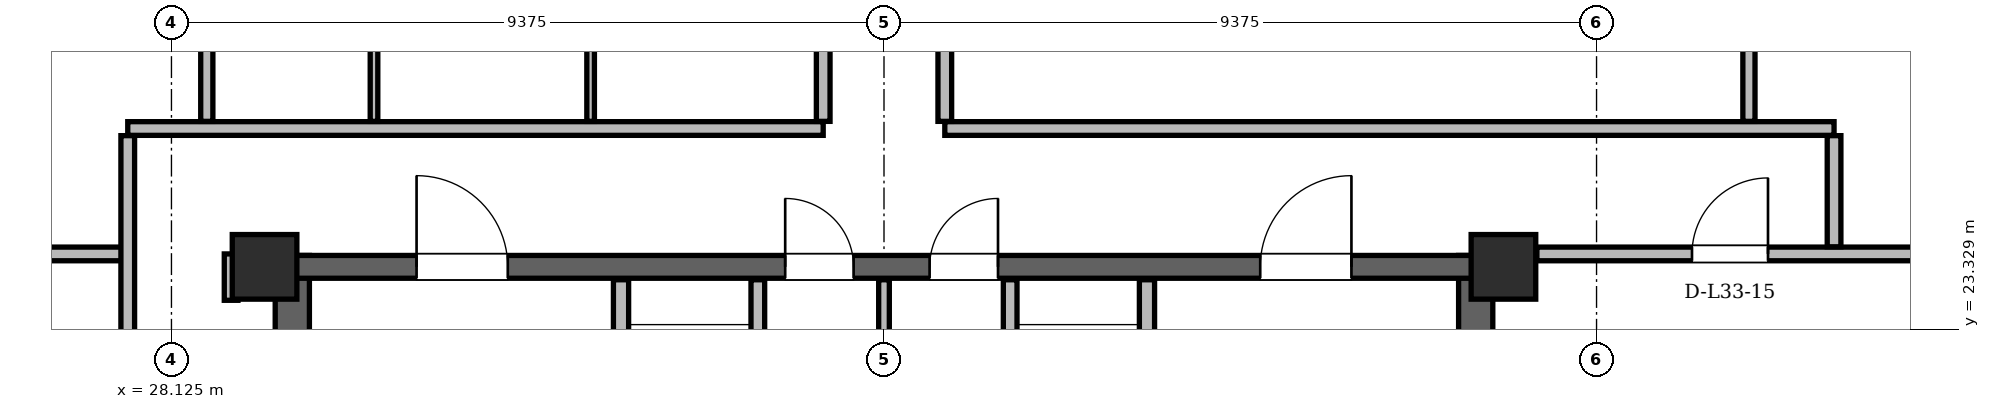
"""IFC4 building model, lengths in metres.
Left out: names, types, materials, properties, quantities, classifications, styles, units other than length and angle.
Written with IfcOpenShell. Run it as: python <this file> out.ifc"""

import sys

from ifc_helpers import new_model, si_unit, direction, frame, frame_2d, origin, origin_2d, place, context, subcontext, project, spatial, rectangle, hollow_rectangle, extrude, element, fill, save


model = new_model("IFC4")
c1 = context("Model", 3, precision=1e-05, world=origin(), true_north=direction((0.0, 1.0)))
c2 = subcontext(c1, "Body", "Model", "MODEL_VIEW")
j1 = project(units=[si_unit("LENGTHUNIT", "METRE"), si_unit("PLANEANGLEUNIT", "RADIAN")], contexts=[c1])
p1 = place(None, origin())
s1 = spatial("IfcSite", under=j1, at=p1, CompositionType="ELEMENT")
p2 = place(p1, origin())
s2 = spatial("IfcBuilding", under=s1, at=p2, CompositionType="ELEMENT")
p3 = place(p2, frame((0.0, 0.0, 126.6)))
s3 = spatial("IfcBuildingStorey", under=s2, at=p3, CompositionType="ELEMENT", Elevation=126.6)
for number, where, z_axis, x_axis in (
    (1, (45.65, 24.15, 0.0), (0.0, 0.0, 1.0), (1.0, 0.0, 0.0)),
    (2, (29.35, 24.15, 0.0), (0.0, 0.0, 1.0), (1.0, 0.0, 0.0)),
):
    element("IfcColumn", number, at=place(p3, frame(where, z_axis=z_axis, x_axis=x_axis)), inside=s3, PredefinedType="COLUMN", context=c2, shape_type="SweptSolid", body=[
        extrude(hollow_rectangle(XDim=0.85, YDim=0.85, WallThickness=0.07, at=origin_2d()), origin(), (0.0, 0.0, 1.0), 3.6),
    ])
for number, where, z_axis, x_axis in (
    (3, (29.715, 11.0, 0.0), (0.0, 0.0, 1.0), (0.0, 1.0, 0.0)),
    (4, (45.285, 11.0, 0.0), (0.0, 0.0, 1.0), (0.0, 1.0, 0.0)),
):
    element("IfcWall", number, at=place(p3, frame(where, z_axis=z_axis, x_axis=x_axis)), inside=s3, PredefinedType="SHEAR", context=c2, shape_type="SweptSolid", body=[
        extrude(rectangle(XDim=13.3, YDim=0.45, at=frame_2d((6.65, 0.0))), origin(), (0.0, 0.0, 1.0), 3.36),
    ])
p4 = place(p3, frame((29.65, 24.15, 0.0), z_axis=(0.0, 0.0, 1.0), x_axis=(1.0, 0.0, 0.0)))
e5 = element("IfcWall", 5, at=p4, inside=s3, PredefinedType="SHEAR", context=c2, shape_type="SweptSolid", body=[
    extrude(rectangle(XDim=15.7, YDim=0.3, at=frame_2d((7.85, 0.0))), origin(), (0.0, 0.0, 1.0), 3.36),
])
p5 = place(p4, frame((1.7, 0.0, 0.0)))
e6 = element("IfcOpeningElement", 6, at=p5, cuts=e5, PredefinedType="OPENING", context=c2, shape_type="SweptSolid", body=[
    extrude(rectangle(XDim=1.2, YDim=2.2, at=frame_2d((0.6, 1.1))), frame((0.0, 0.15, 0.0), z_axis=(0.0, -1.0, 0.0), x_axis=(1.0, 0.0, 0.0)), (0.0, 0.0, 1.0), 0.3),
])
p6 = place(p4, frame((12.8, 0.0, 0.0)))
e7 = element("IfcOpeningElement", 7, at=p6, cuts=e5, PredefinedType="OPENING", context=c2, shape_type="SweptSolid", body=[
    extrude(rectangle(XDim=1.2, YDim=2.2, at=frame_2d((0.6, 1.1))), frame((0.0, 0.15, 0.0), z_axis=(0.0, -1.0, 0.0), x_axis=(1.0, 0.0, 0.0)), (0.0, 0.0, 1.0), 0.3),
])
p7 = place(p4, frame((6.55, 0.0, 0.0)))
e8 = element("IfcOpeningElement", 8, at=p7, cuts=e5, PredefinedType="OPENING", context=c2, shape_type="SweptSolid", body=[
    extrude(rectangle(XDim=0.9, YDim=2.05, at=frame_2d((0.45, 1.025))), frame((0.0, 0.15, 0.0), z_axis=(0.0, -1.0, 0.0), x_axis=(1.0, 0.0, 0.0)), (0.0, 0.0, 1.0), 0.3),
])
p8 = place(p4, frame((8.45, 0.0, 0.0)))
e9 = element("IfcOpeningElement", 9, at=p8, cuts=e5, PredefinedType="OPENING", context=c2, shape_type="SweptSolid", body=[
    extrude(rectangle(XDim=0.9, YDim=2.05, at=frame_2d((0.45, 1.025))), frame((0.0, 0.15, 0.0), z_axis=(0.0, -1.0, 0.0), x_axis=(1.0, 0.0, 0.0)), (0.0, 0.0, 1.0), 0.3),
])
p9 = place(p3, frame((60.311, 13.034, 0.0), z_axis=(0.0, 0.0, 1.0), x_axis=(-0.499998814518, 0.866026088222, 0.0)))
e10 = element("IfcWall", 10, at=p9, inside=s3, PredefinedType="SOLIDWALL", context=c2, shape_type="SweptSolid", body=[
    extrude(rectangle(XDim=35.049, YDim=0.34, at=frame_2d((17.524, 0.0))), origin(), (0.0, 0.0, 1.0), 2.578),
])
p10 = place(p9, frame((8.034, 0.0, 0.0)))
e11 = element("IfcOpeningElement", 11, at=p10, cuts=e10, PredefinedType="OPENING", context=c2, shape_type="SweptSolid", body=[
    extrude(rectangle(XDim=1.5, YDim=2.2, at=frame_2d((0.75, 1.1))), frame((0.0, 0.17, 0.0), z_axis=(0.0, -1.0, 0.0), x_axis=(1.0, 0.0, 0.0)), (0.0, 0.0, 1.0), 0.34),
])
p11 = place(p9, frame((26.969, 0.0, 0.0)))
e12 = element("IfcOpeningElement", 12, at=p11, cuts=e10, PredefinedType="OPENING", context=c2, shape_type="SweptSolid", body=[
    extrude(rectangle(XDim=1.5, YDim=2.2, at=frame_2d((0.75, 1.1))), frame((0.0, 0.17, 0.0), z_axis=(0.0, -1.0, 0.0), x_axis=(1.0, 0.0, 0.0)), (0.0, 0.0, 1.0), 0.34),
])
p12 = place(p9, frame((3.306, 0.0, 0.85)))
e13 = element("IfcOpeningElement", 13, at=p12, cuts=e10, PredefinedType="OPENING", context=c2, shape_type="SweptSolid", body=[
    extrude(rectangle(XDim=1.2, YDim=1.48, at=frame_2d((0.6, 0.74))), frame((0.0, 0.17, 0.0), z_axis=(0.0, -1.0, 0.0), x_axis=(1.0, 0.0, 0.0)), (0.0, 0.0, 1.0), 0.34),
])
p13 = place(p9, frame((11.475, 0.0, 0.85)))
e14 = element("IfcOpeningElement", 14, at=p13, cuts=e10, PredefinedType="OPENING", context=c2, shape_type="SweptSolid", body=[
    extrude(rectangle(XDim=1.2, YDim=1.48, at=frame_2d((0.6, 0.74))), frame((0.0, 0.17, 0.0), z_axis=(0.0, -1.0, 0.0), x_axis=(1.0, 0.0, 0.0)), (0.0, 0.0, 1.0), 0.34),
])
p14 = place(p9, frame((31.134, 0.0, 0.85)))
e15 = element("IfcOpeningElement", 15, at=p14, cuts=e10, PredefinedType="OPENING", context=c2, shape_type="SweptSolid", body=[
    extrude(rectangle(XDim=2.2, YDim=1.618, at=frame_2d((1.1, 0.809))), frame((0.0, 0.17, 0.0), z_axis=(0.0, -1.0, 0.0), x_axis=(1.0, 0.0, 0.0)), (0.0, 0.0, 1.0), 0.34),
])
p15 = place(p9, frame((14.213, 0.0, 0.85)))
e16 = element("IfcOpeningElement", 16, at=p15, cuts=e10, PredefinedType="OPENING", context=c2, shape_type="SweptSolid", body=[
    extrude(rectangle(XDim=2.6, YDim=1.618, at=frame_2d((1.3, 0.809))), frame((0.0, 0.17, 0.0), z_axis=(0.0, -1.0, 0.0), x_axis=(1.0, 0.0, 0.0)), (0.0, 0.0, 1.0), 0.34),
])
p16 = place(p9, frame((18.975, 0.0, 0.85)))
e17 = element("IfcOpeningElement", 17, at=p16, cuts=e10, PredefinedType="OPENING", context=c2, shape_type="SweptSolid", body=[
    extrude(rectangle(XDim=2.0, YDim=1.618, at=frame_2d((1.0, 0.809))), frame((0.0, 0.17, 0.0), z_axis=(0.0, -1.0, 0.0), x_axis=(1.0, 0.0, 0.0)), (0.0, 0.0, 1.0), 0.34),
])
p17 = place(p3, frame((32.214, 43.387, 0.0), z_axis=(0.0, 0.0, 1.0), x_axis=(-0.499998814518, -0.866026088222, 0.0)))
e18 = element("IfcWall", 18, at=p17, inside=s3, PredefinedType="SOLIDWALL", context=c2, shape_type="SweptSolid", body=[
    extrude(rectangle(XDim=35.049, YDim=0.34, at=frame_2d((17.524, 0.0))), origin(), (0.0, 0.0, 1.0), 2.578),
])
p18 = place(p17, frame((8.034, 0.0, 0.0)))
e19 = element("IfcOpeningElement", 19, at=p18, cuts=e18, PredefinedType="OPENING", context=c2, shape_type="SweptSolid", body=[
    extrude(rectangle(XDim=1.5, YDim=2.2, at=frame_2d((0.75, 1.1))), frame((0.0, 0.17, 0.0), z_axis=(0.0, -1.0, 0.0), x_axis=(1.0, 0.0, 0.0)), (0.0, 0.0, 1.0), 0.34),
])
p19 = place(p17, frame((26.97, 0.0, 0.0)))
e20 = element("IfcOpeningElement", 20, at=p19, cuts=e18, PredefinedType="OPENING", context=c2, shape_type="SweptSolid", body=[
    extrude(rectangle(XDim=1.5, YDim=2.2, at=frame_2d((0.75, 1.1))), frame((0.0, 0.17, 0.0), z_axis=(0.0, -1.0, 0.0), x_axis=(1.0, 0.0, 0.0)), (0.0, 0.0, 1.0), 0.34),
])
p20 = place(p17, frame((32.614, 0.0, 0.85)))
e21 = element("IfcOpeningElement", 21, at=p20, cuts=e18, PredefinedType="OPENING", context=c2, shape_type="SweptSolid", body=[
    extrude(rectangle(XDim=1.4, YDim=1.6, at=frame_2d((0.7, 0.8))), frame((0.0, 0.17, 0.0), z_axis=(0.0, -1.0, 0.0), x_axis=(1.0, 0.0, 0.0)), (0.0, 0.0, 1.0), 0.34),
])
p21 = place(p17, frame((22.603, 0.0, 0.85)))
e22 = element("IfcOpeningElement", 22, at=p21, cuts=e18, PredefinedType="OPENING", context=c2, shape_type="SweptSolid", body=[
    extrude(rectangle(XDim=1.2, YDim=1.48, at=frame_2d((0.6, 0.74))), frame((0.0, 0.17, 0.0), z_axis=(0.0, -1.0, 0.0), x_axis=(1.0, 0.0, 0.0)), (0.0, 0.0, 1.0), 0.34),
])
p22 = place(p17, frame((2.414, 0.0, 0.85)))
e23 = element("IfcOpeningElement", 23, at=p22, cuts=e18, PredefinedType="OPENING", context=c2, shape_type="SweptSolid", body=[
    extrude(rectangle(XDim=1.4, YDim=1.6, at=frame_2d((0.7, 0.8))), frame((0.0, 0.17, 0.0), z_axis=(0.0, -1.0, 0.0), x_axis=(1.0, 0.0, 0.0)), (0.0, 0.0, 1.0), 0.34),
])
p23 = place(p17, frame((13.484, 0.0, 0.85)))
e24 = element("IfcOpeningElement", 24, at=p23, cuts=e18, PredefinedType="OPENING", context=c2, shape_type="SweptSolid", body=[
    extrude(rectangle(XDim=2.5, YDim=1.618, at=frame_2d((1.25, 0.809))), frame((0.0, 0.17, 0.0), z_axis=(0.0, -1.0, 0.0), x_axis=(1.0, 0.0, 0.0)), (0.0, 0.0, 1.0), 0.34),
])
p24 = place(p17, frame((18.27, 0.0, 0.85)))
e25 = element("IfcOpeningElement", 25, at=p24, cuts=e18, PredefinedType="OPENING", context=c2, shape_type="SweptSolid", body=[
    extrude(rectangle(XDim=1.2, YDim=1.48, at=frame_2d((0.6, 0.74))), frame((0.0, 0.17, 0.0), z_axis=(0.0, -1.0, 0.0), x_axis=(1.0, 0.0, 0.0)), (0.0, 0.0, 1.0), 0.34),
])
p25 = place(p17, frame((20.466, 0.0, 0.85)))
e26 = element("IfcOpeningElement", 26, at=p25, cuts=e18, PredefinedType="OPENING", context=c2, shape_type="SweptSolid", body=[
    extrude(rectangle(XDim=1.2, YDim=1.48, at=frame_2d((0.6, 0.74))), frame((0.0, 0.17, 0.0), z_axis=(0.0, -1.0, 0.0), x_axis=(1.0, 0.0, 0.0)), (0.0, 0.0, 1.0), 0.34),
])
p26 = place(p3, frame((34.04, 19.48, 0.0), z_axis=(0.0, 0.0, 1.0), x_axis=(0.0, 1.0, 0.0)))
e27 = element("IfcWall", 27, at=p26, inside=s3, PredefinedType="PARTITIONING", context=c2, shape_type="SweptSolid", body=[
    extrude(rectangle(XDim=4.5, YDim=0.2, at=frame_2d((2.25, 0.0))), origin(), (0.0, 0.0, 1.0), 2.4),
])
p27 = place(p26, frame((2.12, 0.0, 0.0)))
e28 = element("IfcOpeningElement", 28, at=p27, cuts=e27, PredefinedType="OPENING", context=c2, shape_type="SweptSolid", body=[
    extrude(rectangle(XDim=1.1, YDim=2.2, at=frame_2d((0.55, 1.1))), frame((0.0, 0.1, 0.0), z_axis=(0.0, -1.0, 0.0), x_axis=(1.0, 0.0, 0.0)), (0.0, 0.0, 1.0), 0.2),
])
p28 = place(p3, frame((35.84, 20.96, 0.0), z_axis=(0.0, 0.0, 1.0), x_axis=(0.0, 1.0, 0.0)))
e29 = element("IfcWall", 29, at=p28, inside=s3, PredefinedType="PARTITIONING", context=c2, shape_type="SweptSolid", body=[
    extrude(rectangle(XDim=3.02, YDim=0.18, at=frame_2d((1.51, 0.0))), origin(), (0.0, 0.0, 1.0), 2.4),
])
p29 = place(p3, frame((40.96, 19.48, 0.0), z_axis=(0.0, 0.0, 1.0), x_axis=(0.0, 1.0, 0.0)))
e30 = element("IfcWall", 30, at=p29, inside=s3, PredefinedType="PARTITIONING", context=c2, shape_type="SweptSolid", body=[
    extrude(rectangle(XDim=4.5, YDim=0.2, at=frame_2d((2.25, 0.0))), origin(), (0.0, 0.0, 1.0), 2.4),
])
p30 = place(p29, frame((2.12, 0.0, 0.0)))
e31 = element("IfcOpeningElement", 31, at=p30, cuts=e30, PredefinedType="OPENING", context=c2, shape_type="SweptSolid", body=[
    extrude(rectangle(XDim=1.1, YDim=2.2, at=frame_2d((0.55, 1.1))), frame((0.0, 0.1, 0.0), z_axis=(0.0, -1.0, 0.0), x_axis=(1.0, 0.0, 0.0)), (0.0, 0.0, 1.0), 0.2),
])
p31 = place(p3, frame((39.16, 20.96, 0.0), z_axis=(0.0, 0.0, 1.0), x_axis=(0.0, 1.0, 0.0)))
e32 = element("IfcWall", 32, at=p31, inside=s3, PredefinedType="PARTITIONING", context=c2, shape_type="SweptSolid", body=[
    extrude(rectangle(XDim=3.02, YDim=0.18, at=frame_2d((1.51, 0.0))), origin(), (0.0, 0.0, 1.0), 2.4),
])
p32 = place(p3, frame((37.5, 21.06, 0.0), z_axis=(0.0, 0.0, 1.0), x_axis=(0.0, 1.0, 0.0)))
e33 = element("IfcWall", 33, at=p32, inside=s3, PredefinedType="PARTITIONING", context=c2, shape_type="SweptSolid", body=[
    extrude(rectangle(XDim=2.92, YDim=0.14, at=frame_2d((1.46, 0.0))), origin(), (0.0, 0.0, 1.0), 2.4),
])
p33 = place(p3, frame((21.406, 24.32, 0.0), z_axis=(0.0, 0.0, 1.0), x_axis=(1.0, 0.0, 0.0)))
e34 = element("IfcWall", 34, at=p33, inside=s3, PredefinedType="PARTITIONING", context=c2, shape_type="SweptSolid", body=[
    extrude(rectangle(XDim=6.204, YDim=0.18, at=frame_2d((3.102, 0.0))), origin(), (0.0, 0.0, 1.0), 3.36),
])
p34 = place(p3, frame((46.09, 24.32, 0.0), z_axis=(0.0, 0.0, 1.0), x_axis=(1.0, 0.0, 0.0)))
e35 = element("IfcWall", 35, at=p34, inside=s3, PredefinedType="PARTITIONING", context=c2, shape_type="SweptSolid", body=[
    extrude(rectangle(XDim=7.504, YDim=0.18, at=frame_2d((3.752, 0.0))), origin(), (0.0, 0.0, 1.0), 3.36),
])
p35 = place(p34, frame((2.041, 0.0, 0.0)))
e36 = element("IfcOpeningElement", 36, at=p35, cuts=e35, PredefinedType="OPENING", context=c2, shape_type="SweptSolid", body=[
    extrude(rectangle(XDim=1.0, YDim=2.18, at=frame_2d((0.5, 1.09))), frame((0.0, 0.09, 0.0), z_axis=(0.0, -1.0, 0.0), x_axis=(1.0, 0.0, 0.0)), (0.0, 0.0, 1.0), 0.18),
])
p36 = place(p3, frame((27.55, 25.97, 0.0), z_axis=(0.0, 0.0, 1.0), x_axis=(1.0, 0.0, 0.0)))
e37 = element("IfcWall", 37, at=p36, inside=s3, PredefinedType="PARTITIONING", context=c2, shape_type="SweptSolid", body=[
    extrude(rectangle(XDim=9.15, YDim=0.18, at=frame_2d((4.575, 0.0))), origin(), (0.0, 0.0, 1.0), 2.814),
])
p37 = place(p3, frame((38.3, 25.97, 0.0), z_axis=(0.0, 0.0, 1.0), x_axis=(1.0, 0.0, 0.0)))
e38 = element("IfcWall", 38, at=p37, inside=s3, PredefinedType="PARTITIONING", context=c2, shape_type="SweptSolid", body=[
    extrude(rectangle(XDim=11.7, YDim=0.18, at=frame_2d((5.85, 0.0))), origin(), (0.0, 0.0, 1.0), 2.814),
])
p38 = place(p3, frame((27.55, 18.544, 0.0), z_axis=(0.0, 0.0, 1.0), x_axis=(0.0, 1.0, 0.0)))
e39 = element("IfcWall", 39, at=p38, inside=s3, PredefinedType="PARTITIONING", context=c2, shape_type="SweptSolid", body=[
    extrude(rectangle(XDim=7.332, YDim=0.18, at=frame_2d((3.666, 0.0))), origin(), (0.0, 0.0, 1.0), 3.36),
])
p39 = place(p3, frame((28.59, 26.064, 0.0), z_axis=(0.0, 0.0, 1.0), x_axis=(0.0, 1.0, 0.0)))
e40 = element("IfcWall", 40, at=p39, inside=s3, PredefinedType="PARTITIONING", context=c2, shape_type="SweptSolid", body=[
    extrude(rectangle(XDim=1.542, YDim=0.16, at=frame_2d((0.771, 0.0))), origin(), (0.0, 0.0, 1.0), 3.36),
])
p40 = place(p3, frame((28.91, 23.71, 0.0), z_axis=(0.0, 0.0, 1.0), x_axis=(0.0, 1.0, 0.0)))
e41 = element("IfcWall", 41, at=p40, inside=s3, PredefinedType="PARTITIONING", context=c2, shape_type="SweptSolid", body=[
    extrude(rectangle(XDim=0.61, YDim=0.18, at=frame_2d((0.305, 0.0))), origin(), (0.0, 0.0, 1.0), 3.36),
])
for number, where, z_axis, x_axis in (
    (42, (30.79, 26.064, 0.0), (0.0, 0.0, 1.0), (0.0, 1.0, 0.0)),
    (43, (33.64, 26.064, 0.0), (0.0, 0.0, 1.0), (0.0, 1.0, 0.0)),
):
    element("IfcWall", number, at=place(p3, frame(where, z_axis=z_axis, x_axis=x_axis)), inside=s3, PredefinedType="PARTITIONING", context=c2, shape_type="SweptSolid", body=[
        extrude(rectangle(XDim=1.542, YDim=0.1, at=frame_2d((0.771, 0.0))), origin(), (0.0, 0.0, 1.0), 3.36),
    ])
p41 = place(p3, frame((36.7, 26.064, 0.0), z_axis=(0.0, 0.0, 1.0), x_axis=(0.0, 1.0, 0.0)))
e44 = element("IfcWall", 44, at=p41, inside=s3, PredefinedType="PARTITIONING", context=c2, shape_type="SweptSolid", body=[
    extrude(rectangle(XDim=17.149, YDim=0.18, at=frame_2d((8.575, 0.0))), origin(), (0.0, 0.0, 1.0), 3.36),
])
p42 = place(p41, frame((7.06, 0.0, 0.0)))
e45 = element("IfcOpeningElement", 45, at=p42, cuts=e44, PredefinedType="OPENING", context=c2, shape_type="SweptSolid", body=[
    extrude(rectangle(XDim=1.0, YDim=2.18, at=frame_2d((0.5, 1.09))), frame((0.0, 0.09, 0.0), z_axis=(0.0, -1.0, 0.0), x_axis=(1.0, 0.0, 0.0)), (0.0, 0.0, 1.0), 0.18),
])
p43 = place(p3, frame((38.3, 26.064, 0.0), z_axis=(0.0, 0.0, 1.0), x_axis=(0.0, 1.0, 0.0)))
e46 = element("IfcWall", 46, at=p43, inside=s3, PredefinedType="PARTITIONING", context=c2, shape_type="SweptSolid", body=[
    extrude(rectangle(XDim=13.442, YDim=0.18, at=frame_2d((6.721, 0.0))), origin(), (0.0, 0.0, 1.0), 3.36),
])
p44 = place(p43, frame((6.146, 0.0, 0.0)))
e47 = element("IfcOpeningElement", 47, at=p44, cuts=e46, PredefinedType="OPENING", context=c2, shape_type="SweptSolid", body=[
    extrude(rectangle(XDim=1.0, YDim=2.18, at=frame_2d((0.5, 1.09))), frame((0.0, 0.09, 0.0), z_axis=(0.0, -1.0, 0.0), x_axis=(1.0, 0.0, 0.0)), (0.0, 0.0, 1.0), 0.18),
])
p45 = place(p3, frame((48.88, 26.064, 0.0), z_axis=(0.0, 0.0, 1.0), x_axis=(0.0, 1.0, 0.0)))
e48 = element("IfcWall", 48, at=p45, inside=s3, PredefinedType="PARTITIONING", context=c2, shape_type="SweptSolid", body=[
    extrude(rectangle(XDim=6.421, YDim=0.16, at=frame_2d((3.21, 0.0))), origin(), (0.0, 0.0, 1.0), 2.578),
])
p46 = place(p45, frame((2.747, 0.0, 0.0)))
e49 = element("IfcOpeningElement", 49, at=p46, cuts=e48, PredefinedType="OPENING", context=c2, shape_type="SweptSolid", body=[
    extrude(rectangle(XDim=0.88, YDim=2.08, at=frame_2d((0.44, 1.04))), frame((0.0, 0.08, 0.0), z_axis=(0.0, -1.0, 0.0), x_axis=(1.0, 0.0, 0.0)), (0.0, 0.0, 1.0), 0.16),
])
p47 = place(p3, frame((50.0, 24.414, 0.0), z_axis=(0.0, 0.0, 1.0), x_axis=(0.0, 1.0, 0.0)))
e50 = element("IfcWall", 50, at=p47, inside=s3, PredefinedType="PARTITIONING", context=c2, shape_type="SweptSolid", body=[
    extrude(rectangle(XDim=1.462, YDim=0.18, at=frame_2d((0.731, 0.0))), origin(), (0.0, 0.0, 1.0), 3.36),
])
p48 = place(p5, origin())
e51 = element("IfcDoor", 51, at=p48, inside=s3, OperationType="SINGLE_SWING_LEFT", PredefinedType="DOOR", context=c2, shape_type="SweptSolid", body=[
    extrude(rectangle(XDim=1.2, YDim=2.2, at=frame_2d((0.6, 1.1))), frame((0.0, 0.025, 0.0), z_axis=(0.0, -1.0, 0.0), x_axis=(1.0, 0.0, 0.0)), (0.0, 0.0, 1.0), 0.05),
])
fill(e6, e51)
p49 = place(p6, origin())
e52 = element("IfcDoor", 52, at=p49, inside=s3, OperationType="SINGLE_SWING_RIGHT", PredefinedType="DOOR", context=c2, shape_type="SweptSolid", body=[
    extrude(rectangle(XDim=1.2, YDim=2.2, at=frame_2d((0.6, 1.1))), frame((0.0, 0.025, 0.0), z_axis=(0.0, -1.0, 0.0), x_axis=(1.0, 0.0, 0.0)), (0.0, 0.0, 1.0), 0.05),
])
fill(e7, e52)
p50 = place(p7, origin())
e53 = element("IfcDoor", 53, at=p50, inside=s3, OperationType="SINGLE_SWING_LEFT", PredefinedType="DOOR", context=c2, shape_type="SweptSolid", body=[
    extrude(rectangle(XDim=0.9, YDim=2.05, at=frame_2d((0.45, 1.025))), frame((0.0, 0.025, 0.0), z_axis=(0.0, -1.0, 0.0), x_axis=(1.0, 0.0, 0.0)), (0.0, 0.0, 1.0), 0.05),
])
fill(e8, e53)
p51 = place(p8, origin())
e54 = element("IfcDoor", 54, at=p51, inside=s3, OperationType="SINGLE_SWING_RIGHT", PredefinedType="DOOR", context=c2, shape_type="SweptSolid", body=[
    extrude(rectangle(XDim=0.9, YDim=2.05, at=frame_2d((0.45, 1.025))), frame((0.0, 0.025, 0.0), z_axis=(0.0, -1.0, 0.0), x_axis=(1.0, 0.0, 0.0)), (0.0, 0.0, 1.0), 0.05),
])
fill(e9, e54)
p52 = place(p35, origin())
e55 = element("IfcDoor", 55, at=p52, inside=s3, OperationType="SINGLE_SWING_RIGHT", PredefinedType="DOOR", context=c2, shape_type="SweptSolid", body=[
    extrude(rectangle(XDim=1.0, YDim=2.18, at=frame_2d((0.5, 1.09))), frame((0.0, 0.025, 0.0), z_axis=(0.0, -1.0, 0.0), x_axis=(1.0, 0.0, 0.0)), (0.0, 0.0, 1.0), 0.05),
])
fill(e36, e55)
save(model, sys.argv[1])
